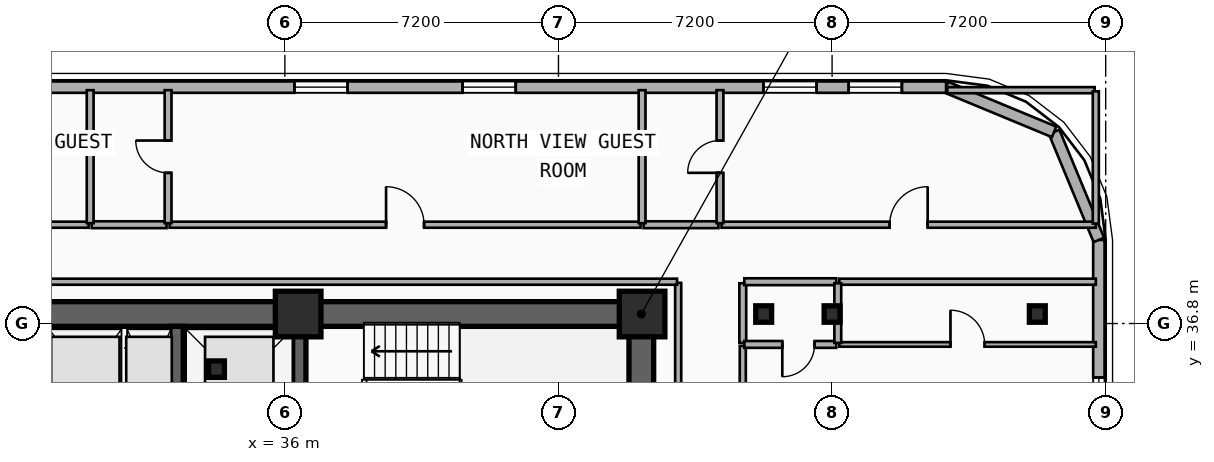
"""IFC4 building model, lengths in metres.
Left out: names, types, materials, properties, quantities, classifications, styles, units other than length and angle.
Written with IfcOpenShell. Run it as: python <this file> out.ifc"""

import sys

from ifc_helpers import new_model, si_unit, direction, frame, frame_2d, origin, origin_2d, place, context, subcontext, project, spatial, rectangle, i_section, extrude, element, fill, save


model = new_model("IFC4")
c1 = context("Model", 3, precision=1e-05, world=origin(), true_north=direction((0.0, 1.0)))
c2 = subcontext(c1, "Body", "Model", "MODEL_VIEW")
j1 = project(units=[si_unit("LENGTHUNIT", "METRE"), si_unit("PLANEANGLEUNIT", "RADIAN")], contexts=[c1])
p1 = place(None, origin())
s1 = spatial("IfcSite", under=j1, at=p1, CompositionType="ELEMENT")
p2 = place(p1, origin())
s2 = spatial("IfcBuilding", under=s1, at=p2, CompositionType="ELEMENT")
p3 = place(p2, frame((0.0, 0.0, 122.3)))
s3 = spatial("IfcBuildingStorey", under=s2, at=p3, CompositionType="ELEMENT", Elevation=122.3)
p4 = place(p3, frame((12.15, 37.05, 0.0), z_axis=(0.0, 0.0, 1.0), x_axis=(1.0, 0.0, 0.0)))
e1 = element("IfcWall", 1, at=p4, inside=s3, PredefinedType="SHEAR", context=c2, shape_type="SweptSolid", body=[
    extrude(rectangle(XDim=33.23, YDim=0.65, at=frame_2d((16.615, 0.0))), origin(), (0.0, 0.0, 1.0), 3.5),
])
p5 = place(p3, frame((45.38, 28.145, 0.0), z_axis=(0.0, 0.0, 1.0), x_axis=(0.0, 1.0, 0.0)))
e2 = element("IfcWall", 2, at=p5, inside=s3, PredefinedType="SHEAR", context=c2, shape_type="SweptSolid", body=[
    extrude(rectangle(XDim=8.58, YDim=0.65, at=frame_2d((4.29, 0.0))), origin(), (0.0, 0.0, 1.0), 3.5),
])
p6 = place(p3, frame((33.15, 28.145, 0.0), z_axis=(0.0, 0.0, 1.0), x_axis=(0.0, 1.0, 0.0)))
e3 = element("IfcWall", 3, at=p6, inside=s3, PredefinedType="SHEAR", context=c2, shape_type="SweptSolid", body=[
    extrude(rectangle(XDim=8.58, YDim=0.35, at=frame_2d((4.29, 0.0))), origin(), (0.0, 0.0, 1.0), 3.5),
])
p7 = place(p3, frame((36.38, 28.145, 0.0), z_axis=(0.0, 0.0, 1.0), x_axis=(0.0, 1.0, 0.0)))
e4 = element("IfcWall", 4, at=p7, inside=s3, PredefinedType="SHEAR", context=c2, shape_type="SweptSolid", body=[
    extrude(rectangle(XDim=8.58, YDim=0.35, at=frame_2d((4.29, 0.0))), origin(), (0.0, 0.0, 1.0), 3.5),
])
p8 = place(p7, frame((3.635, 0.0, 0.0)))
e5 = element("IfcOpeningElement", 5, at=p8, cuts=e4, PredefinedType="OPENING", context=c2, shape_type="SweptSolid", body=[
    extrude(rectangle(XDim=1.1, YDim=2.15, at=frame_2d((0.55, 1.075))), frame((0.0, 0.185, 0.0), z_axis=(0.0, -1.0, 0.0), x_axis=(1.0, 0.0, 0.0)), (0.0, 0.0, 1.0), 0.37),
])
p9 = place(p3, frame((34.2, 35.6, 0.0), z_axis=(0.0, 0.0, 1.0), x_axis=(1.0, 0.0, 0.0)))
e6 = element("IfcColumn", 6, at=p9, inside=s3, PredefinedType="COLUMN", context=c2, shape_type="SweptSolid", body=[
    extrude(i_section(OverallWidth=0.418, OverallDepth=0.432, WebThickness=0.035, FlangeThickness=0.056, FilletRadius=0.015, at=origin_2d()), origin(), (0.0, 0.0, 1.0), 3.5),
])
for number, where, z_axis, x_axis in (
    (7, (36.35, 37.05, 0.0), (0.0, 0.0, 1.0), (1.0, 0.0, 0.0)),
    (8, (45.4, 37.05, 0.0), (0.0, 0.0, 1.0), (1.0, 0.0, 0.0)),
):
    element("IfcColumn", number, at=place(p3, frame(where, z_axis=z_axis, x_axis=x_axis)), inside=s3, PredefinedType="COLUMN", context=c2, shape_type="SweptSolid", body=[
        extrude(rectangle(XDim=1.2, YDim=1.2, at=origin_2d()), origin(), (0.0, 0.0, 1.0), 3.5),
    ])
for number, where, z_axis, x_axis in (
    (9, (48.6, 37.05, 0.0), (0.0, 0.0, 1.0), (1.0, 0.0, 0.0)),
    (10, (50.4, 37.05, 0.0), (0.0, 0.0, 1.0), (1.0, 0.0, 0.0)),
    (11, (55.8, 37.05, 0.0), (0.0, 0.0, 1.0), (1.0, 0.0, 0.0)),
):
    element("IfcColumn", number, at=place(p3, frame(where, z_axis=z_axis, x_axis=x_axis)), inside=s3, PredefinedType="COLUMN", context=c2, shape_type="SweptSolid", body=[
        extrude(i_section(OverallWidth=0.418, OverallDepth=0.432, WebThickness=0.035, FlangeThickness=0.056, FilletRadius=0.015, at=origin_2d()), origin(), (0.0, 0.0, 1.0), 3.5),
    ])
p10 = place(p3, frame((57.42, 39.0, 0.0), z_axis=(0.0, 0.0, 1.0), x_axis=(0.0, -1.0, 0.0)))
e12 = element("IfcWall", 12, at=p10, inside=s3, PredefinedType="SOLIDWALL", context=c2, shape_type="SweptSolid", body=[
    extrude(rectangle(XDim=18.0, YDim=0.3, at=frame_2d((9.0, 0.0))), origin(), (0.0, 0.0, 1.0), 3.24),
])
p11 = place(p10, frame((8.882, 0.0, 0.48)))
e13 = element("IfcOpeningElement", 13, at=p11, cuts=e12, PredefinedType="OPENING", context=c2, shape_type="SweptSolid", body=[
    extrude(rectangle(XDim=1.4, YDim=1.8, at=frame_2d((0.7, 0.9))), frame((0.0, 0.16, 0.0), z_axis=(0.0, -1.0, 0.0), x_axis=(1.0, 0.0, 0.0)), (0.0, 0.0, 1.0), 0.32),
])
p12 = place(p10, frame((3.621, 0.0, 0.48)))
e14 = element("IfcOpeningElement", 14, at=p12, cuts=e12, PredefinedType="OPENING", context=c2, shape_type="SweptSolid", body=[
    extrude(rectangle(XDim=1.4, YDim=1.8, at=frame_2d((0.7, 0.9))), frame((0.0, 0.16, 0.0), z_axis=(0.0, -1.0, 0.0), x_axis=(1.0, 0.0, 0.0)), (0.0, 0.0, 1.0), 0.32),
])
p13 = place(p10, frame((14.625, 0.0, 0.48)))
e15 = element("IfcOpeningElement", 15, at=p13, cuts=e12, PredefinedType="OPENING", context=c2, shape_type="SweptSolid", body=[
    extrude(rectangle(XDim=1.4, YDim=1.8, at=frame_2d((0.7, 0.9))), frame((0.0, 0.16, 0.0), z_axis=(0.0, -1.0, 0.0), x_axis=(1.0, 0.0, 0.0)), (0.0, 0.0, 1.0), 0.32),
])
p14 = place(p3, frame((56.243, 41.843, 0.0), z_axis=(0.0, 0.0, 1.0), x_axis=(0.382636798336, -0.92389884758, 0.0)))
e16 = element("IfcWall", 16, at=p14, inside=s3, PredefinedType="SOLIDWALL", context=c2, shape_type="SweptSolid", body=[
    extrude(rectangle(XDim=3.077, YDim=0.3, at=frame_2d((1.538, 0.0))), origin(), (0.0, 0.0, 1.0), 3.24),
])
p15 = place(p3, frame((53.4, 43.02, 0.0), z_axis=(0.0, 0.0, 1.0), x_axis=(0.923882414032, -0.382676475685, 0.0)))
e17 = element("IfcWall", 17, at=p15, inside=s3, PredefinedType="SOLIDWALL", context=c2, shape_type="SweptSolid", body=[
    extrude(rectangle(XDim=3.077, YDim=0.3, at=frame_2d((1.539, 0.0))), origin(), (0.0, 0.0, 1.0), 3.24),
])
p16 = place(p3, frame((4.2, 43.02, 0.0), z_axis=(0.0, 0.0, 1.0), x_axis=(1.0, 0.0, 0.0)))
e18 = element("IfcWall", 18, at=p16, inside=s3, PredefinedType="SOLIDWALL", context=c2, shape_type="SweptSolid", body=[
    extrude(rectangle(XDim=49.2, YDim=0.3, at=frame_2d((24.6, 0.0))), origin(), (0.0, 0.0, 1.0), 3.24),
])
p17 = place(p16, frame((4.872, 0.0, 0.85)))
e19 = element("IfcOpeningElement", 19, at=p17, cuts=e18, PredefinedType="OPENING", context=c2, shape_type="SweptSolid", body=[
    extrude(rectangle(XDim=1.4, YDim=1.8, at=frame_2d((0.7, 0.9))), frame((0.0, 0.16, 0.0), z_axis=(0.0, -1.0, 0.0), x_axis=(1.0, 0.0, 0.0)), (0.0, 0.0, 1.0), 0.32),
])
p18 = place(p16, frame((7.983, 0.0, 0.85)))
e20 = element("IfcOpeningElement", 20, at=p18, cuts=e18, PredefinedType="OPENING", context=c2, shape_type="SweptSolid", body=[
    extrude(rectangle(XDim=1.4, YDim=1.8, at=frame_2d((0.7, 0.9))), frame((0.0, 0.16, 0.0), z_axis=(0.0, -1.0, 0.0), x_axis=(1.0, 0.0, 0.0)), (0.0, 0.0, 1.0), 0.32),
])
p19 = place(p16, frame((18.389, 0.0, 0.85)))
e21 = element("IfcOpeningElement", 21, at=p19, cuts=e18, PredefinedType="OPENING", context=c2, shape_type="SweptSolid", body=[
    extrude(rectangle(XDim=1.4, YDim=1.8, at=frame_2d((0.7, 0.9))), frame((0.0, 0.16, 0.0), z_axis=(0.0, -1.0, 0.0), x_axis=(1.0, 0.0, 0.0)), (0.0, 0.0, 1.0), 0.32),
])
p20 = place(p16, frame((22.383, 0.0, 0.85)))
e22 = element("IfcOpeningElement", 22, at=p20, cuts=e18, PredefinedType="OPENING", context=c2, shape_type="SweptSolid", body=[
    extrude(rectangle(XDim=1.4, YDim=1.8, at=frame_2d((0.7, 0.9))), frame((0.0, 0.16, 0.0), z_axis=(0.0, -1.0, 0.0), x_axis=(1.0, 0.0, 0.0)), (0.0, 0.0, 1.0), 0.32),
])
p21 = place(p16, frame((32.051, 0.0, 0.85)))
e23 = element("IfcOpeningElement", 23, at=p21, cuts=e18, PredefinedType="OPENING", context=c2, shape_type="SweptSolid", body=[
    extrude(rectangle(XDim=1.4, YDim=1.8, at=frame_2d((0.7, 0.9))), frame((0.0, 0.16, 0.0), z_axis=(0.0, -1.0, 0.0), x_axis=(1.0, 0.0, 0.0)), (0.0, 0.0, 1.0), 0.32),
])
p22 = place(p16, frame((36.476, 0.0, 0.85)))
e24 = element("IfcOpeningElement", 24, at=p22, cuts=e18, PredefinedType="OPENING", context=c2, shape_type="SweptSolid", body=[
    extrude(rectangle(XDim=1.4, YDim=1.8, at=frame_2d((0.7, 0.9))), frame((0.0, 0.16, 0.0), z_axis=(0.0, -1.0, 0.0), x_axis=(1.0, 0.0, 0.0)), (0.0, 0.0, 1.0), 0.32),
])
p23 = place(p16, frame((44.393, 0.0, 0.85)))
e25 = element("IfcOpeningElement", 25, at=p23, cuts=e18, PredefinedType="OPENING", context=c2, shape_type="SweptSolid", body=[
    extrude(rectangle(XDim=1.4, YDim=1.8, at=frame_2d((0.7, 0.9))), frame((0.0, 0.16, 0.0), z_axis=(0.0, -1.0, 0.0), x_axis=(1.0, 0.0, 0.0)), (0.0, 0.0, 1.0), 0.32),
])
p24 = place(p16, frame((46.637, 0.0, 0.85)))
e26 = element("IfcOpeningElement", 26, at=p24, cuts=e18, PredefinedType="OPENING", context=c2, shape_type="SweptSolid", body=[
    extrude(rectangle(XDim=1.4, YDim=1.8, at=frame_2d((0.7, 0.9))), frame((0.0, 0.16, 0.0), z_axis=(0.0, -1.0, 0.0), x_axis=(1.0, 0.0, 0.0)), (0.0, 0.0, 1.0), 0.32),
])
p25 = place(p3, frame((48.05, 33.149, 0.0), z_axis=(0.0, 0.0, 1.0), x_axis=(0.0, 1.0, 0.0)))
e27 = element("IfcWall", 27, at=p25, inside=s3, PredefinedType="PARTITIONING", context=c2, shape_type="SweptSolid", body=[
    extrude(rectangle(XDim=3.061, YDim=0.16, at=frame_2d((1.531, 0.0))), origin(), (0.0, 0.0, 1.0), 3.24),
])
p26 = place(p25, frame((1.031, 0.0, 0.0)))
e28 = element("IfcOpeningElement", 28, at=p26, cuts=e27, PredefinedType="OPENING", context=c2, shape_type="SweptSolid", body=[
    extrude(rectangle(XDim=1.0, YDim=2.15, at=frame_2d((0.5, 1.075))), frame((0.0, 0.09, 0.0), z_axis=(0.0, -1.0, 0.0), x_axis=(1.0, 0.0, 0.0)), (0.0, 0.0, 1.0), 0.18),
])
p27 = place(p3, frame((48.05, 36.29, 0.0), z_axis=(0.0, 0.0, 1.0), x_axis=(0.0, 1.0, 0.0)))
e29 = element("IfcWall", 29, at=p27, inside=s3, PredefinedType="PLUMBINGWALL", context=c2, shape_type="SweptSolid", body=[
    extrude(rectangle(XDim=1.57, YDim=0.18, at=frame_2d((0.785, 0.0))), origin(), (0.0, 0.0, 1.0), 2.72),
])
p28 = place(p3, frame((48.09, 37.9, 0.0), z_axis=(0.0, 0.0, 1.0), x_axis=(1.0, 0.0, 0.0)))
e30 = element("IfcWall", 30, at=p28, inside=s3, PredefinedType="PLUMBINGWALL", context=c2, shape_type="SweptSolid", body=[
    extrude(rectangle(XDim=2.42, YDim=0.18, at=frame_2d((1.21, 0.0))), origin(), (0.0, 0.0, 1.0), 3.24),
])
p29 = place(p3, frame((50.59, 37.9, 0.0), z_axis=(0.0, 0.0, 1.0), x_axis=(1.0, 0.0, 0.0)))
e31 = element("IfcWall", 31, at=p29, inside=s3, PredefinedType="PARTITIONING", context=c2, shape_type="SweptSolid", body=[
    extrude(rectangle(XDim=6.75, YDim=0.16, at=frame_2d((3.375, 0.0))), origin(), (0.0, 0.0, 1.0), 3.24),
])
p30 = place(p3, frame((19.735, 39.4, 0.0), z_axis=(0.0, 0.0, 1.0), x_axis=(1.0, 0.0, 0.0)))
e32 = element("IfcWall", 32, at=p30, inside=s3, PredefinedType="PARTITIONING", context=c2, shape_type="SweptSolid", body=[
    extrude(rectangle(XDim=11.102, YDim=0.16, at=frame_2d((5.551, 0.0))), origin(), (0.0, 0.0, 1.0), 3.24),
])
p31 = place(p30, frame((5.051, 0.0, 0.0)))
e33 = element("IfcOpeningElement", 33, at=p31, cuts=e32, PredefinedType="OPENING", context=c2, shape_type="SweptSolid", body=[
    extrude(rectangle(XDim=1.0, YDim=2.15, at=frame_2d((0.5, 1.075))), frame((0.0, 0.09, 0.0), z_axis=(0.0, -1.0, 0.0), x_axis=(1.0, 0.0, 0.0)), (0.0, 0.0, 1.0), 0.18),
])
p32 = place(p3, frame((32.967, 39.4, 0.0), z_axis=(0.0, 0.0, 1.0), x_axis=(1.0, 0.0, 0.0)))
e34 = element("IfcWall", 34, at=p32, inside=s3, PredefinedType="PARTITIONING", context=c2, shape_type="SweptSolid", body=[
    extrude(rectangle(XDim=12.393, YDim=0.16, at=frame_2d((6.197, 0.0))), origin(), (0.0, 0.0, 1.0), 3.24),
])
p33 = place(p32, frame((5.697, 0.0, 0.0)))
e35 = element("IfcOpeningElement", 35, at=p33, cuts=e34, PredefinedType="OPENING", context=c2, shape_type="SweptSolid", body=[
    extrude(rectangle(XDim=1.0, YDim=2.15, at=frame_2d((0.5, 1.075))), frame((0.0, 0.09, 0.0), z_axis=(0.0, -1.0, 0.0), x_axis=(1.0, 0.0, 0.0)), (0.0, 0.0, 1.0), 0.18),
])
p34 = place(p3, frame((30.917, 39.4, 0.0), z_axis=(0.0, 0.0, 1.0), x_axis=(1.0, 0.0, 0.0)))
e36 = element("IfcWall", 36, at=p34, inside=s3, PredefinedType="PLUMBINGWALL", context=c2, shape_type="SweptSolid", body=[
    extrude(rectangle(XDim=1.97, YDim=0.18, at=frame_2d((0.985, 0.0))), origin(), (0.0, 0.0, 1.0), 3.24),
])
p35 = place(p3, frame((47.49, 39.4, 0.0), z_axis=(0.0, 0.0, 1.0), x_axis=(1.0, 0.0, 0.0)))
e37 = element("IfcWall", 37, at=p35, inside=s3, PredefinedType="PARTITIONING", context=c2, shape_type="SweptSolid", body=[
    extrude(rectangle(XDim=9.85, YDim=0.16, at=frame_2d((4.925, 0.0))), origin(), (0.0, 0.0, 1.0), 3.24),
])
p36 = place(p35, frame((4.425, 0.0, 0.0)))
e38 = element("IfcOpeningElement", 38, at=p36, cuts=e37, PredefinedType="OPENING", context=c2, shape_type="SweptSolid", body=[
    extrude(rectangle(XDim=1.0, YDim=2.15, at=frame_2d((0.5, 1.075))), frame((0.0, 0.09, 0.0), z_axis=(0.0, -1.0, 0.0), x_axis=(1.0, 0.0, 0.0)), (0.0, 0.0, 1.0), 0.18),
])
p37 = place(p3, frame((45.44, 39.4, 0.0), z_axis=(0.0, 0.0, 1.0), x_axis=(1.0, 0.0, 0.0)))
e39 = element("IfcWall", 39, at=p37, inside=s3, PredefinedType="PLUMBINGWALL", context=c2, shape_type="SweptSolid", body=[
    extrude(rectangle(XDim=1.97, YDim=0.18, at=frame_2d((0.985, 0.0))), origin(), (0.0, 0.0, 1.0), 3.24),
])
p38 = place(p3, frame((50.51, 36.25, 0.0), z_axis=(0.0, 0.0, 1.0), x_axis=(-1.0, 0.0, 0.0)))
e40 = element("IfcWall", 40, at=p38, inside=s3, PredefinedType="PLUMBINGWALL", context=c2, shape_type="SweptSolid", body=[
    extrude(rectangle(XDim=2.42, YDim=0.18, at=frame_2d((1.21, 0.0))), origin(), (0.0, 0.0, 1.0), 2.57),
])
p39 = place(p38, frame((0.57, 0.0, 0.0)))
e41 = element("IfcOpeningElement", 41, at=p39, cuts=e40, PredefinedType="OPENING", context=c2, shape_type="SweptSolid", body=[
    extrude(rectangle(XDim=0.85, YDim=2.1, at=frame_2d((0.425, 1.05))), frame((0.0, 0.1, 0.0), z_axis=(0.0, -1.0, 0.0), x_axis=(1.0, 0.0, 0.0)), (0.0, 0.0, 1.0), 0.2),
])
p40 = place(p3, frame((50.59, 36.25, 0.0), z_axis=(0.0, 0.0, 1.0), x_axis=(1.0, 0.0, 0.0)))
e42 = element("IfcWall", 42, at=p40, inside=s3, PredefinedType="PARTITIONING", context=c2, shape_type="SweptSolid", body=[
    extrude(rectangle(XDim=6.75, YDim=0.12, at=frame_2d((3.375, 0.0))), origin(), (0.0, 0.0, 1.0), 2.57),
])
p41 = place(p40, frame((2.925, 0.0, 0.0)))
e43 = element("IfcOpeningElement", 43, at=p41, cuts=e42, PredefinedType="OPENING", context=c2, shape_type="SweptSolid", body=[
    extrude(rectangle(XDim=0.9, YDim=2.1, at=frame_2d((0.45, 1.05))), frame((0.0, 0.07, 0.0), z_axis=(0.0, -1.0, 0.0), x_axis=(1.0, 0.0, 0.0)), (0.0, 0.0, 1.0), 0.14),
])
p42 = place(p3, frame((50.55, 36.29, 0.0), z_axis=(0.0, 0.0, 1.0), x_axis=(0.0, 1.0, 0.0)))
e44 = element("IfcWall", 44, at=p42, inside=s3, PredefinedType="PLUMBINGWALL", context=c2, shape_type="SweptSolid", body=[
    extrude(rectangle(XDim=1.57, YDim=0.18, at=frame_2d((0.785, 0.0))), origin(), (0.0, 0.0, 1.0), 2.57),
])
p43 = place(p3, frame((30.877, 39.44, 0.0), z_axis=(0.0, 0.0, 1.0), x_axis=(0.0, 1.0, 0.0)))
e45 = element("IfcWall", 45, at=p43, inside=s3, PredefinedType="PLUMBINGWALL", context=c2, shape_type="SweptSolid", body=[
    extrude(rectangle(XDim=3.5, YDim=0.18, at=frame_2d((1.75, 0.0))), origin(), (0.0, 0.0, 1.0), 3.24),
])
p44 = place(p3, frame((32.927, 39.44, 0.0), z_axis=(0.0, 0.0, 1.0), x_axis=(0.0, 1.0, 0.0)))
e46 = element("IfcWall", 46, at=p44, inside=s3, PredefinedType="PLUMBINGWALL", context=c2, shape_type="SweptSolid", body=[
    extrude(rectangle(XDim=3.5, YDim=0.18, at=frame_2d((1.75, 0.0))), origin(), (0.0, 0.0, 1.0), 3.24),
])
p45 = place(p44, frame((1.325, 0.0, 0.0)))
e47 = element("IfcOpeningElement", 47, at=p45, cuts=e46, PredefinedType="OPENING", context=c2, shape_type="SweptSolid", body=[
    extrude(rectangle(XDim=0.85, YDim=2.1, at=frame_2d((0.425, 1.05))), frame((0.0, 0.1, 0.0), z_axis=(0.0, -1.0, 0.0), x_axis=(1.0, 0.0, 0.0)), (0.0, 0.0, 1.0), 0.2),
])
p46 = place(p3, frame((45.4, 39.44, 0.0), z_axis=(0.0, 0.0, 1.0), x_axis=(0.0, 1.0, 0.0)))
e48 = element("IfcWall", 48, at=p46, inside=s3, PredefinedType="PLUMBINGWALL", context=c2, shape_type="SweptSolid", body=[
    extrude(rectangle(XDim=3.5, YDim=0.18, at=frame_2d((1.75, 0.0))), origin(), (0.0, 0.0, 1.0), 3.24),
])
p47 = place(p3, frame((47.45, 39.44, 0.0), z_axis=(0.0, 0.0, 1.0), x_axis=(0.0, 1.0, 0.0)))
e49 = element("IfcWall", 49, at=p47, inside=s3, PredefinedType="PLUMBINGWALL", context=c2, shape_type="SweptSolid", body=[
    extrude(rectangle(XDim=3.5, YDim=0.18, at=frame_2d((1.75, 0.0))), origin(), (0.0, 0.0, 1.0), 3.24),
])
p48 = place(p47, frame((1.325, 0.0, 0.0)))
e50 = element("IfcOpeningElement", 50, at=p48, cuts=e49, PredefinedType="OPENING", context=c2, shape_type="SweptSolid", body=[
    extrude(rectangle(XDim=0.85, YDim=2.1, at=frame_2d((0.425, 1.05))), frame((0.0, 0.1, 0.0), z_axis=(0.0, -1.0, 0.0), x_axis=(1.0, 0.0, 0.0)), (0.0, 0.0, 1.0), 0.2),
])
p49 = place(p3, frame((46.35, 27.63, 0.0), z_axis=(0.0, 0.0, 1.0), x_axis=(0.0, 1.0, 0.0)))
e51 = element("IfcWall", 51, at=p49, inside=s3, PredefinedType="PARTITIONING", context=c2, shape_type="SweptSolid", body=[
    extrude(rectangle(XDim=10.24, YDim=0.16, at=frame_2d((5.12, 0.0))), origin(), (0.0, 0.0, 1.0), 2.72),
])
p50 = place(p3, frame((11.28, 37.9, 0.0), z_axis=(0.0, 0.0, 1.0), x_axis=(1.0, 0.0, 0.0)))
e52 = element("IfcWall", 52, at=p50, inside=s3, PredefinedType="PARTITIONING", context=c2, shape_type="SweptSolid", body=[
    extrude(rectangle(XDim=35.04, YDim=0.16, at=frame_2d((17.52, 0.0))), origin(), (0.0, 0.0, 1.0), 3.24),
])
p51 = place(p3, frame((53.43, 42.94, 0.0), z_axis=(0.0, 0.0, 1.0), x_axis=(1.0, 0.0, 0.0)))
e53 = element("IfcWall", 53, at=p51, inside=s3, PredefinedType="PARTITIONING", context=c2, shape_type="SweptSolid", body=[
    extrude(rectangle(XDim=3.88, YDim=0.16, at=frame_2d((1.94, 0.0))), origin(), (0.0, 0.0, 1.0), 3.24),
])
p52 = place(p3, frame((57.34, 39.43, 0.0), z_axis=(0.0, 0.0, 1.0), x_axis=(0.0, 1.0, 0.0)))
e54 = element("IfcWall", 54, at=p52, inside=s3, PredefinedType="PARTITIONING", context=c2, shape_type="SweptSolid", body=[
    extrude(rectangle(XDim=3.48, YDim=0.16, at=frame_2d((1.74, 0.0))), origin(), (0.0, 0.0, 1.0), 3.24),
])
p53 = place(p12, origin())
e55 = element("IfcWindow", 55, at=p53, inside=s3, PartitioningType="SINGLE_PANEL", PredefinedType="WINDOW", context=c2, shape_type="SweptSolid", body=[
    extrude(rectangle(XDim=1.4, YDim=1.8, at=frame_2d((0.7, 0.9))), frame((0.0, 0.03, 0.0), z_axis=(0.0, -1.0, 0.0), x_axis=(1.0, 0.0, 0.0)), (0.0, 0.0, 1.0), 0.06),
])
fill(e14, e55)
p54 = place(p21, origin())
e56 = element("IfcWindow", 56, at=p54, inside=s3, PartitioningType="SINGLE_PANEL", PredefinedType="WINDOW", context=c2, shape_type="SweptSolid", body=[
    extrude(rectangle(XDim=1.4, YDim=1.8, at=frame_2d((0.7, 0.9))), frame((0.0, 0.03, 0.0), z_axis=(0.0, -1.0, 0.0), x_axis=(1.0, 0.0, 0.0)), (0.0, 0.0, 1.0), 0.06),
])
fill(e23, e56)
p55 = place(p22, origin())
e57 = element("IfcWindow", 57, at=p55, inside=s3, PartitioningType="SINGLE_PANEL", PredefinedType="WINDOW", context=c2, shape_type="SweptSolid", body=[
    extrude(rectangle(XDim=1.4, YDim=1.8, at=frame_2d((0.7, 0.9))), frame((0.0, 0.03, 0.0), z_axis=(0.0, -1.0, 0.0), x_axis=(1.0, 0.0, 0.0)), (0.0, 0.0, 1.0), 0.06),
])
fill(e24, e57)
p56 = place(p23, origin())
e58 = element("IfcWindow", 58, at=p56, inside=s3, PartitioningType="SINGLE_PANEL", PredefinedType="WINDOW", context=c2, shape_type="SweptSolid", body=[
    extrude(rectangle(XDim=1.4, YDim=1.8, at=frame_2d((0.7, 0.9))), frame((0.0, 0.03, 0.0), z_axis=(0.0, -1.0, 0.0), x_axis=(1.0, 0.0, 0.0)), (0.0, 0.0, 1.0), 0.06),
])
fill(e25, e58)
p57 = place(p24, origin())
e59 = element("IfcWindow", 59, at=p57, inside=s3, PartitioningType="SINGLE_PANEL", PredefinedType="WINDOW", context=c2, shape_type="SweptSolid", body=[
    extrude(rectangle(XDim=1.4, YDim=1.8, at=frame_2d((0.7, 0.9))), frame((0.0, 0.03, 0.0), z_axis=(0.0, -1.0, 0.0), x_axis=(1.0, 0.0, 0.0)), (0.0, 0.0, 1.0), 0.06),
])
fill(e26, e59)
p58 = place(p33, origin())
e60 = element("IfcDoor", 60, at=p58, inside=s3, OperationType="SINGLE_SWING_LEFT", PredefinedType="DOOR", context=c2, shape_type="SweptSolid", body=[
    extrude(rectangle(XDim=1.0, YDim=2.15, at=frame_2d((0.5, 1.075))), frame((0.0, 0.025, 0.0), z_axis=(0.0, -1.0, 0.0), x_axis=(1.0, 0.0, 0.0)), (0.0, 0.0, 1.0), 0.05),
])
fill(e35, e60)
p59 = place(p36, origin())
e61 = element("IfcDoor", 61, at=p59, inside=s3, OperationType="SINGLE_SWING_RIGHT", PredefinedType="DOOR", context=c2, shape_type="SweptSolid", body=[
    extrude(rectangle(XDim=1.0, YDim=2.15, at=frame_2d((0.5, 1.075))), frame((0.0, 0.025, 0.0), z_axis=(0.0, -1.0, 0.0), x_axis=(1.0, 0.0, 0.0)), (0.0, 0.0, 1.0), 0.05),
])
fill(e38, e61)
p60 = place(p39, origin())
e62 = element("IfcDoor", 62, at=p60, inside=s3, OperationType="SINGLE_SWING_RIGHT", PredefinedType="DOOR", context=c2, shape_type="SweptSolid", body=[
    extrude(rectangle(XDim=0.85, YDim=2.1, at=frame_2d((0.425, 1.05))), frame((0.0, 0.025, 0.0), z_axis=(0.0, -1.0, 0.0), x_axis=(1.0, 0.0, 0.0)), (0.0, 0.0, 1.0), 0.05),
])
fill(e41, e62)
p61 = place(p41, origin())
e63 = element("IfcDoor", 63, at=p61, inside=s3, OperationType="SINGLE_SWING_LEFT", PredefinedType="DOOR", context=c2, shape_type="SweptSolid", body=[
    extrude(rectangle(XDim=0.9, YDim=2.1, at=frame_2d((0.45, 1.05))), frame((0.0, 0.025, 0.0), z_axis=(0.0, -1.0, 0.0), x_axis=(1.0, 0.0, 0.0)), (0.0, 0.0, 1.0), 0.05),
])
fill(e43, e63)
p62 = place(p45, origin())
e64 = element("IfcDoor", 64, at=p62, inside=s3, OperationType="SINGLE_SWING_RIGHT", PredefinedType="DOOR", context=c2, shape_type="SweptSolid", body=[
    extrude(rectangle(XDim=0.85, YDim=2.1, at=frame_2d((0.425, 1.05))), frame((0.0, 0.025, 0.0), z_axis=(0.0, -1.0, 0.0), x_axis=(1.0, 0.0, 0.0)), (0.0, 0.0, 1.0), 0.05),
])
fill(e47, e64)
p63 = place(p48, origin())
e65 = element("IfcDoor", 65, at=p63, inside=s3, OperationType="SINGLE_SWING_LEFT", PredefinedType="DOOR", context=c2, shape_type="SweptSolid", body=[
    extrude(rectangle(XDim=0.85, YDim=2.1, at=frame_2d((0.425, 1.05))), frame((0.0, 0.025, 0.0), z_axis=(0.0, -1.0, 0.0), x_axis=(1.0, 0.0, 0.0)), (0.0, 0.0, 1.0), 0.05),
])
fill(e50, e65)
save(model, sys.argv[1])
